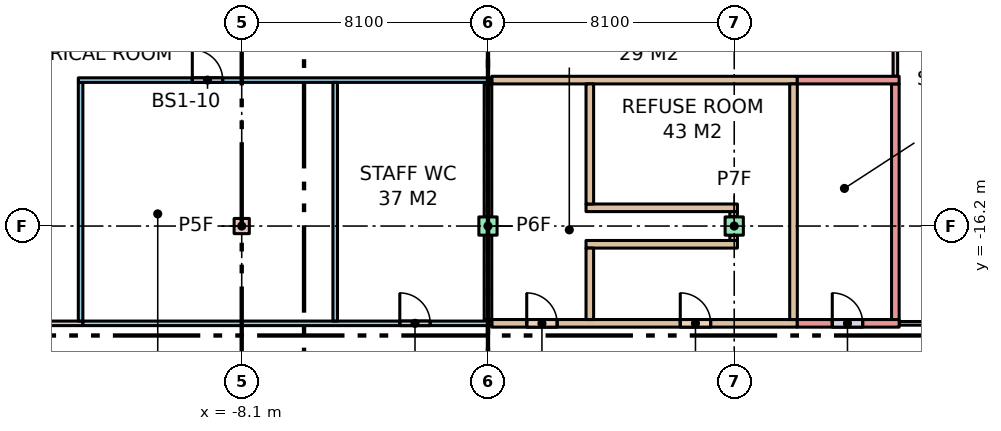
"""IFC4 building model, lengths in metres.
Left out: names, types, materials, properties, quantities, classifications, styles, units other than length and angle.
Written with IfcOpenShell. Run it as: python <this file> out.ifc"""

import sys

from ifc_helpers import new_model, si_unit, direction, frame, frame_2d, origin, origin_2d, place, context, subcontext, project, spatial, rectangle, extrude, element, fill, save


model = new_model("IFC4")
c1 = context("Model", 3, precision=1e-05, world=origin(), true_north=direction((0.0, 1.0)))
c2 = subcontext(c1, "Body", "Model", "MODEL_VIEW")
j1 = project(units=[si_unit("LENGTHUNIT", "METRE"), si_unit("PLANEANGLEUNIT", "RADIAN")], contexts=[c1])
p1 = place(None, origin())
s1 = spatial("IfcSite", under=j1, at=p1, CompositionType="ELEMENT")
p2 = place(p1, origin())
s2 = spatial("IfcBuilding", under=s1, at=p2, CompositionType="ELEMENT")
p3 = place(p2, frame((0.0, 0.0, -3.6)))
s3 = spatial("IfcBuildingStorey", under=s2, at=p3, CompositionType="ELEMENT", Elevation=-3.6)
p4 = place(p3, frame((-8.1, -16.2, 0.0), z_axis=(0.0, 0.0, 1.0), x_axis=(1.0, 0.0, 0.0)))
e1 = element("IfcColumn", 1, at=p4, inside=s3, PredefinedType="COLUMN", context=c2, shape_type="SweptSolid", body=[
    extrude(rectangle(XDim=0.5, YDim=0.5, at=origin_2d()), origin(), (0.0, 0.0, 1.0), 3.6),
])
for number, where, z_axis, x_axis in (
    (2, (0.0, -16.2, 0.0), (0.0, 0.0, 1.0), (1.0, 0.0, 0.0)),
    (3, (8.1, -16.2, 0.0), (0.0, 0.0, 1.0), (1.0, 0.0, 0.0)),
):
    element("IfcColumn", number, at=place(p3, frame(where, z_axis=z_axis, x_axis=x_axis)), inside=s3, PredefinedType="COLUMN", context=c2, shape_type="SweptSolid", body=[
        extrude(rectangle(XDim=0.6, YDim=0.6, at=origin_2d()), origin(), (0.0, 0.0, 1.0), 3.6),
    ])
p5 = place(p3, frame((-17.778, -19.4, 0.0), z_axis=(0.0, 0.0, 1.0), x_axis=(1.0, 0.0, 0.0)))
e4 = element("IfcWall", 4, at=p5, inside=s3, PredefinedType="PARTITIONING", context=c2, shape_type="SweptSolid", body=[
    extrude(rectangle(XDim=4.453, YDim=0.15, at=frame_2d((2.227, 0.0))), origin(), (0.0, 0.0, 1.0), 3.15),
])
p6 = place(p3, frame((-13.4, -19.325, 0.0), z_axis=(0.0, 0.0, 1.0), x_axis=(0.0, 1.0, 0.0)))
e5 = element("IfcWall", 5, at=p6, inside=s3, PredefinedType="PARTITIONING", context=c2, shape_type="SweptSolid", body=[
    extrude(rectangle(XDim=7.85, YDim=0.15, at=frame_2d((3.925, 0.0))), origin(), (0.0, 0.0, 1.0), 3.15),
])
p7 = place(p3, frame((13.525, -19.4, 0.0), z_axis=(0.0, 0.0, 1.0), x_axis=(1.0, 0.0, 0.0)))
e6 = element("IfcWall", 6, at=p7, inside=s3, PredefinedType="PARTITIONING", context=c2, shape_type="SweptSolid", body=[
    extrude(rectangle(XDim=4.253, YDim=0.12, at=frame_2d((2.127, 0.0))), origin(), (0.0, 0.0, 1.0), 3.15),
])
p8 = place(p7, frame((1.65, 0.0, 0.0)))
e7 = element("IfcOpeningElement", 7, at=p8, cuts=e6, PredefinedType="OPENING", context=c2, shape_type="SweptSolid", body=[
    extrude(rectangle(XDim=1.0, YDim=2.1, at=frame_2d((0.5, 1.05))), frame((0.0, 0.07, 0.0), z_axis=(0.0, -1.0, 0.0), x_axis=(1.0, 0.0, 0.0)), (0.0, 0.0, 1.0), 0.14),
])
p9 = place(p3, frame((13.4, -11.275, 0.0), z_axis=(0.0, 0.0, 1.0), x_axis=(0.0, 1.0, 0.0)))
e8 = element("IfcWall", 8, at=p9, inside=s3, PredefinedType="PARTITIONING", context=c2, shape_type="SweptSolid", body=[
    extrude(rectangle(XDim=11.15, YDim=0.15, at=frame_2d((5.575, 0.0))), origin(), (0.0, 0.0, 1.0), 3.15),
])
p10 = place(p3, frame((13.4, -19.275, 0.0), z_axis=(0.0, 0.0, 1.0), x_axis=(0.0, 1.0, 0.0)))
e9 = element("IfcWall", 9, at=p10, inside=s3, PredefinedType="PARTITIONING", context=c2, shape_type="SweptSolid", body=[
    extrude(rectangle(XDim=7.75, YDim=0.25, at=frame_2d((3.875, 0.0))), origin(), (0.0, 0.0, 1.0), 3.15),
])
p11 = place(p3, frame((-13.325, -19.4, 0.0), z_axis=(0.0, 0.0, 1.0), x_axis=(1.0, 0.0, 0.0)))
e10 = element("IfcWall", 10, at=p11, inside=s3, PredefinedType="PARTITIONING", context=c2, shape_type="SweptSolid", body=[
    extrude(rectangle(XDim=13.45, YDim=0.15, at=frame_2d((6.725, 0.0))), origin(), (0.0, 0.0, 1.0), 3.15),
])
p12 = place(p11, frame((10.425, 0.0, 0.0)))
e11 = element("IfcOpeningElement", 11, at=p12, cuts=e10, PredefinedType="OPENING", context=c2, shape_type="SweptSolid", body=[
    extrude(rectangle(XDim=1.0, YDim=2.1, at=frame_2d((0.5, 1.05))), frame((0.0, 0.085, 0.0), z_axis=(0.0, -1.0, 0.0), x_axis=(1.0, 0.0, 0.0)), (0.0, 0.0, 1.0), 0.17),
])
p13 = place(p3, frame((0.125, -19.4, 0.0), z_axis=(0.0, 0.0, 1.0), x_axis=(1.0, 0.0, 0.0)))
e12 = element("IfcWall", 12, at=p13, inside=s3, PredefinedType="PARTITIONING", context=c2, shape_type="SweptSolid", body=[
    extrude(rectangle(XDim=10.05, YDim=0.25, at=frame_2d((5.025, 0.0))), origin(), (0.0, 0.0, 1.0), 3.15),
])
p14 = place(p13, frame((1.15, 0.0, 0.0)))
e13 = element("IfcOpeningElement", 13, at=p14, cuts=e12, PredefinedType="OPENING", context=c2, shape_type="SweptSolid", body=[
    extrude(rectangle(XDim=1.0, YDim=2.1, at=frame_2d((0.5, 1.05))), frame((0.0, 0.135, 0.0), z_axis=(0.0, -1.0, 0.0), x_axis=(1.0, 0.0, 0.0)), (0.0, 0.0, 1.0), 0.27),
])
p15 = place(p13, frame((6.2, 0.0, 0.0)))
e14 = element("IfcOpeningElement", 14, at=p15, cuts=e12, PredefinedType="OPENING", context=c2, shape_type="SweptSolid", body=[
    extrude(rectangle(XDim=1.0, YDim=2.1, at=frame_2d((0.5, 1.05))), frame((0.0, 0.135, 0.0), z_axis=(0.0, -1.0, 0.0), x_axis=(1.0, 0.0, 0.0)), (0.0, 0.0, 1.0), 0.27),
])
p16 = place(p3, frame((10.175, -19.4, 0.0), z_axis=(0.0, 0.0, 1.0), x_axis=(1.0, 0.0, 0.0)))
e15 = element("IfcWall", 15, at=p16, inside=s3, PredefinedType="PARTITIONING", context=c2, shape_type="SweptSolid", body=[
    extrude(rectangle(XDim=3.35, YDim=0.25, at=frame_2d((1.675, 0.0))), origin(), (0.0, 0.0, 1.0), 3.15),
])
p17 = place(p16, frame((1.15, 0.0, 0.0)))
e16 = element("IfcOpeningElement", 16, at=p17, cuts=e15, PredefinedType="OPENING", context=c2, shape_type="SweptSolid", body=[
    extrude(rectangle(XDim=1.0, YDim=2.1, at=frame_2d((0.5, 1.05))), frame((0.0, 0.135, 0.0), z_axis=(0.0, -1.0, 0.0), x_axis=(1.0, 0.0, 0.0)), (0.0, 0.0, 1.0), 0.27),
])
p18 = place(p3, frame((-13.475, -11.4, 0.0), z_axis=(0.0, 0.0, 1.0), x_axis=(1.0, 0.0, 0.0)))
e17 = element("IfcWall", 17, at=p18, inside=s3, PredefinedType="PARTITIONING", context=c2, shape_type="SweptSolid", body=[
    extrude(rectangle(XDim=13.6, YDim=0.15, at=frame_2d((6.8, 0.0))), origin(), (0.0, 0.0, 1.0), 3.15),
])
p19 = place(p18, frame((3.75, 0.0, 0.0)))
e18 = element("IfcOpeningElement", 18, at=p19, cuts=e17, PredefinedType="OPENING", context=c2, shape_type="SweptSolid", body=[
    extrude(rectangle(XDim=1.0, YDim=2.1, at=frame_2d((0.5, 1.05))), frame((0.0, 0.085, 0.0), z_axis=(0.0, -1.0, 0.0), x_axis=(1.0, 0.0, 0.0)), (0.0, 0.0, 1.0), 0.17),
])
p20 = place(p3, frame((0.125, -11.4, 0.0), z_axis=(0.0, 0.0, 1.0), x_axis=(1.0, 0.0, 0.0)))
e19 = element("IfcWall", 19, at=p20, inside=s3, PredefinedType="PARTITIONING", context=c2, shape_type="SweptSolid", body=[
    extrude(rectangle(XDim=10.05, YDim=0.25, at=frame_2d((5.025, 0.0))), origin(), (0.0, 0.0, 1.0), 3.15),
])
p21 = place(p3, frame((10.175, -11.4, 0.0), z_axis=(0.0, 0.0, 1.0), x_axis=(1.0, 0.0, 0.0)))
e20 = element("IfcWall", 20, at=p21, inside=s3, PredefinedType="PARTITIONING", context=c2, shape_type="SweptSolid", body=[
    extrude(rectangle(XDim=3.35, YDim=0.25, at=frame_2d((1.675, 0.0))), origin(), (0.0, 0.0, 1.0), 3.15),
])
p22 = place(p3, frame((-5.025, -19.325, 0.0), z_axis=(0.0, 0.0, 1.0), x_axis=(0.0, 1.0, 0.0)))
e21 = element("IfcWall", 21, at=p22, inside=s3, PredefinedType="PARTITIONING", context=c2, shape_type="SweptSolid", body=[
    extrude(rectangle(XDim=7.85, YDim=0.15, at=frame_2d((3.925, 0.0))), origin(), (0.0, 0.0, 1.0), 3.15),
])
p23 = place(p3, frame((0.0, -19.275, 0.0), z_axis=(0.0, 0.0, 1.0), x_axis=(0.0, 1.0, 0.0)))
e22 = element("IfcWall", 22, at=p23, inside=s3, PredefinedType="PARTITIONING", context=c2, shape_type="SweptSolid", body=[
    extrude(rectangle(XDim=2.765, YDim=0.25, at=frame_2d((1.382, 0.0))), origin(), (0.0, 0.0, 1.0), 3.15),
])
p24 = place(p3, frame((0.0, -15.89, 0.0), z_axis=(0.0, 0.0, 1.0), x_axis=(0.0, 1.0, 0.0)))
e23 = element("IfcWall", 23, at=p24, inside=s3, PredefinedType="PARTITIONING", context=c2, shape_type="SweptSolid", body=[
    extrude(rectangle(XDim=4.365, YDim=0.25, at=frame_2d((2.183, 0.0))), origin(), (0.0, 0.0, 1.0), 3.15),
])
for number, where, z_axis, x_axis in (
    (24, (3.225, -16.8, 0.0), (0.0, 0.0, 1.0), (1.0, 0.0, 0.0)),
    (25, (3.225, -15.6, 0.0), (0.0, 0.0, 1.0), (1.0, 0.0, 0.0)),
):
    element("IfcWall", number, at=place(p3, frame(where, z_axis=z_axis, x_axis=x_axis)), inside=s3, PredefinedType="PARTITIONING", context=c2, shape_type="SweptSolid", body=[
        extrude(rectangle(XDim=4.98, YDim=0.25, at=frame_2d((2.49, 0.0))), origin(), (0.0, 0.0, 1.0), 3.15),
    ])
p25 = place(p3, frame((3.35, -19.275, 0.0), z_axis=(0.0, 0.0, 1.0), x_axis=(0.0, 1.0, 0.0)))
e26 = element("IfcWall", 26, at=p25, inside=s3, PredefinedType="PARTITIONING", context=c2, shape_type="SweptSolid", body=[
    extrude(rectangle(XDim=2.35, YDim=0.25, at=frame_2d((1.175, 0.0))), origin(), (0.0, 0.0, 1.0), 3.15),
])
p26 = place(p3, frame((3.35, -15.475, 0.0), z_axis=(0.0, 0.0, 1.0), x_axis=(0.0, 1.0, 0.0)))
e27 = element("IfcWall", 27, at=p26, inside=s3, PredefinedType="PARTITIONING", context=c2, shape_type="SweptSolid", body=[
    extrude(rectangle(XDim=3.95, YDim=0.25, at=frame_2d((1.975, 0.0))), origin(), (0.0, 0.0, 1.0), 3.15),
])
p27 = place(p3, frame((8.08, -16.675, 0.0), z_axis=(0.0, 0.0, 1.0), x_axis=(0.0, 1.0, 0.0)))
e28 = element("IfcWall", 28, at=p27, inside=s3, PredefinedType="PARTITIONING", context=c2, shape_type="SweptSolid", body=[
    extrude(rectangle(XDim=0.165, YDim=0.25, at=frame_2d((0.083, 0.0))), origin(), (0.0, 0.0, 1.0), 3.15),
])
p28 = place(p3, frame((8.08, -15.89, 0.0), z_axis=(0.0, 0.0, 1.0), x_axis=(0.0, 1.0, 0.0)))
e29 = element("IfcWall", 29, at=p28, inside=s3, PredefinedType="PARTITIONING", context=c2, shape_type="SweptSolid", body=[
    extrude(rectangle(XDim=0.165, YDim=0.25, at=frame_2d((0.083, 0.0))), origin(), (0.0, 0.0, 1.0), 3.15),
])
p29 = place(p3, frame((10.05, -19.275, 0.0), z_axis=(0.0, 0.0, 1.0), x_axis=(0.0, 1.0, 0.0)))
e30 = element("IfcWall", 30, at=p29, inside=s3, PredefinedType="PARTITIONING", context=c2, shape_type="SweptSolid", body=[
    extrude(rectangle(XDim=7.75, YDim=0.25, at=frame_2d((3.875, 0.0))), origin(), (0.0, 0.0, 1.0), 3.15),
])
p30 = place(p19, origin())
e31 = element("IfcDoor", 31, at=p30, inside=s3, OperationType="SINGLE_SWING_LEFT", PredefinedType="DOOR", context=c2, shape_type="SweptSolid", body=[
    extrude(rectangle(XDim=1.0, YDim=2.1, at=frame_2d((0.5, 1.05))), frame((0.0, 0.025, 0.0), z_axis=(0.0, -1.0, 0.0), x_axis=(1.0, 0.0, 0.0)), (0.0, 0.0, 1.0), 0.05),
])
fill(e18, e31)
p31 = place(p12, origin())
e32 = element("IfcDoor", 32, at=p31, inside=s3, OperationType="SINGLE_SWING_LEFT", PredefinedType="DOOR", context=c2, shape_type="SweptSolid", body=[
    extrude(rectangle(XDim=1.0, YDim=2.1, at=frame_2d((0.5, 1.05))), frame((0.0, 0.025, 0.0), z_axis=(0.0, -1.0, 0.0), x_axis=(1.0, 0.0, 0.0)), (0.0, 0.0, 1.0), 0.05),
])
fill(e11, e32)
p32 = place(p14, origin())
e33 = element("IfcDoor", 33, at=p32, inside=s3, OperationType="SINGLE_SWING_LEFT", PredefinedType="DOOR", context=c2, shape_type="SweptSolid", body=[
    extrude(rectangle(XDim=1.0, YDim=2.1, at=frame_2d((0.5, 1.05))), frame((0.0, 0.025, 0.0), z_axis=(0.0, -1.0, 0.0), x_axis=(1.0, 0.0, 0.0)), (0.0, 0.0, 1.0), 0.05),
])
fill(e13, e33)
p33 = place(p15, origin())
e34 = element("IfcDoor", 34, at=p33, inside=s3, OperationType="SINGLE_SWING_LEFT", PredefinedType="DOOR", context=c2, shape_type="SweptSolid", body=[
    extrude(rectangle(XDim=1.0, YDim=2.1, at=frame_2d((0.5, 1.05))), frame((0.0, 0.025, 0.0), z_axis=(0.0, -1.0, 0.0), x_axis=(1.0, 0.0, 0.0)), (0.0, 0.0, 1.0), 0.05),
])
fill(e14, e34)
p34 = place(p17, origin())
e35 = element("IfcDoor", 35, at=p34, inside=s3, OperationType="SINGLE_SWING_LEFT", PredefinedType="DOOR", context=c2, shape_type="SweptSolid", body=[
    extrude(rectangle(XDim=1.0, YDim=2.1, at=frame_2d((0.5, 1.05))), frame((0.0, 0.025, 0.0), z_axis=(0.0, -1.0, 0.0), x_axis=(1.0, 0.0, 0.0)), (0.0, 0.0, 1.0), 0.05),
])
fill(e16, e35)
save(model, sys.argv[1])
